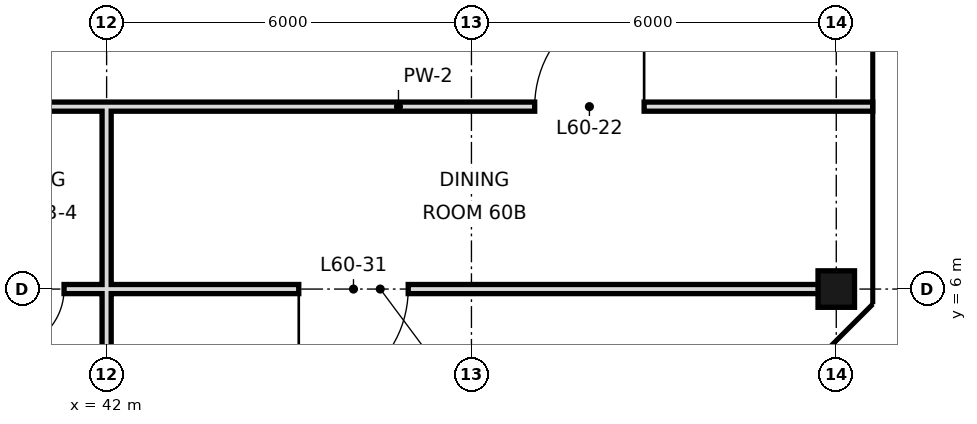
"""IFC4 building model, lengths in metres.
Left out: names, types, materials, properties, quantities, classifications, styles, units other than length and angle.
Written with IfcOpenShell. Run it as: python <this file> out.ifc"""

import sys

from ifc_helpers import new_model, si_unit, direction, frame, frame_2d, origin, origin_2d, place, context, subcontext, project, spatial, rectangle, hollow_rectangle, extrude, element, fill, save


model = new_model("IFC4")
c1 = context("Model", 3, precision=1e-05, world=origin(), true_north=direction((0.0, 1.0)))
c2 = subcontext(c1, "Body", "Model", "MODEL_VIEW")
j1 = project(units=[si_unit("LENGTHUNIT", "METRE"), si_unit("PLANEANGLEUNIT", "RADIAN")], contexts=[c1])
p1 = place(None, origin())
s1 = spatial("IfcSite", under=j1, at=p1, CompositionType="ELEMENT")
p2 = place(p1, origin())
s2 = spatial("IfcBuilding", under=s1, at=p2, CompositionType="ELEMENT")
p3 = place(p2, frame((0.0, 0.0, 254.0)))
s3 = spatial("IfcBuildingStorey", under=s2, at=p3, CompositionType="ELEMENT", Elevation=254.0)
p4 = place(p3, frame((54.0, 6.0, 0.0), z_axis=(0.0, 0.0, 1.0), x_axis=(1.0, 0.0, 0.0)))
e1 = element("IfcColumn", 1, at=p4, inside=s3, PredefinedType="COLUMN", context=c2, shape_type="SweptSolid", body=[
    extrude(hollow_rectangle(XDim=0.6, YDim=0.6, WallThickness=0.028, at=origin_2d()), origin(), (0.0, 0.0, 1.0), 3.6),
])
p5 = place(p3, frame((42.0, -0.6, 0.0), z_axis=(0.0, 0.0, 1.0), x_axis=(0.0, 1.0, 0.0)))
e2 = element("IfcWall", 2, at=p5, inside=s3, PredefinedType="PARTITIONING", context=c2, shape_type="SweptSolid", body=[
    extrude(rectangle(XDim=9.6, YDim=0.15, at=frame_2d((4.8, 0.0))), origin(), (0.0, 0.0, 1.0), 2.68),
])
p6 = place(p3, frame((39.0, 6.0, 0.0), z_axis=(0.0, 0.0, 1.0), x_axis=(1.0, 0.0, 0.0)))
e3 = element("IfcWall", 3, at=p6, inside=s3, PredefinedType="PARTITIONING", context=c2, shape_type="SweptSolid", body=[
    extrude(rectangle(XDim=15.0, YDim=0.15, at=frame_2d((7.5, 0.0))), origin(), (0.0, 0.0, 1.0), 2.93),
])
p7 = place(p6, frame((1.3, 0.0, 0.0)))
e4 = element("IfcOpeningElement", 4, at=p7, cuts=e3, PredefinedType="OPENING", context=c2, shape_type="SweptSolid", body=[
    extrude(rectangle(XDim=1.0, YDim=2.4, at=frame_2d((0.5, 1.2))), frame((0.0, 0.085, 0.0), z_axis=(0.0, -1.0, 0.0), x_axis=(1.0, 0.0, 0.0)), (0.0, 0.0, 1.0), 0.17),
])
p8 = place(p6, frame((6.16, 0.0, 0.0)))
e5 = element("IfcOpeningElement", 5, at=p8, cuts=e3, PredefinedType="OPENING", context=c2, shape_type="SweptSolid", body=[
    extrude(rectangle(XDim=1.8, YDim=2.4, at=frame_2d((0.9, 1.2))), frame((0.0, 0.085, 0.0), z_axis=(0.0, -1.0, 0.0), x_axis=(1.0, 0.0, 0.0)), (0.0, 0.0, 1.0), 0.17),
])
p9 = place(p3, frame((39.0, 9.0, 0.0), z_axis=(0.0, 0.0, 1.0), x_axis=(1.0, 0.0, 0.0)))
e6 = element("IfcWall", 6, at=p9, inside=s3, PredefinedType="PARTITIONING", context=c2, shape_type="SweptSolid", body=[
    extrude(rectangle(XDim=15.6, YDim=0.15, at=frame_2d((7.8, 0.0))), origin(), (0.0, 0.0, 1.0), 3.38),
])
p10 = place(p9, frame((1.0, 0.0, 0.0)))
e7 = element("IfcOpeningElement", 7, at=p10, cuts=e6, PredefinedType="OPENING", context=c2, shape_type="SweptSolid", body=[
    extrude(rectangle(XDim=1.0, YDim=2.4, at=frame_2d((0.5, 1.2))), frame((0.0, 0.085, 0.0), z_axis=(0.0, -1.0, 0.0), x_axis=(1.0, 0.0, 0.0)), (0.0, 0.0, 1.0), 0.17),
])
p11 = place(p9, frame((10.04, 0.0, 0.0)))
e8 = element("IfcOpeningElement", 8, at=p11, cuts=e6, PredefinedType="OPENING", context=c2, shape_type="SweptSolid", body=[
    extrude(rectangle(XDim=1.8, YDim=2.4, at=frame_2d((0.9, 1.2))), frame((0.0, 0.085, 0.0), z_axis=(0.0, -1.0, 0.0), x_axis=(1.0, 0.0, 0.0)), (0.0, 0.0, 1.0), 0.17),
])
p12 = place(p11, frame((1.8, 0.0, 0.0), z_axis=(0.0, 0.0, 1.0), x_axis=(-1.0, 0.0, 0.0)))
e9 = element("IfcDoor", 9, at=p12, inside=s3, OperationType="SINGLE_SWING_LEFT", PredefinedType="DOOR", context=c2, shape_type="SweptSolid", body=[
    extrude(rectangle(XDim=1.8, YDim=2.4, at=frame_2d((0.9, 1.2))), frame((0.0, 0.025, 0.0), z_axis=(0.0, -1.0, 0.0), x_axis=(1.0, 0.0, 0.0)), (0.0, 0.0, 1.0), 0.05),
])
fill(e8, e9)
p13 = place(p7, frame((1.0, 0.0, 0.0), z_axis=(0.0, 0.0, 1.0), x_axis=(-1.0, 0.0, 0.0)))
e10 = element("IfcDoor", 10, at=p13, inside=s3, OperationType="SINGLE_SWING_RIGHT", PredefinedType="DOOR", context=c2, shape_type="SweptSolid", body=[
    extrude(rectangle(XDim=1.0, YDim=2.4, at=frame_2d((0.5, 1.2))), frame((0.0, 0.025, 0.0), z_axis=(0.0, -1.0, 0.0), x_axis=(1.0, 0.0, 0.0)), (0.0, 0.0, 1.0), 0.05),
])
fill(e4, e10)
p14 = place(p8, frame((1.8, 0.0, 0.0), z_axis=(0.0, 0.0, 1.0), x_axis=(-1.0, 0.0, 0.0)))
e11 = element("IfcDoor", 11, at=p14, inside=s3, OperationType="SINGLE_SWING_RIGHT", PredefinedType="DOOR", context=c2, shape_type="SweptSolid", body=[
    extrude(rectangle(XDim=1.8, YDim=2.4, at=frame_2d((0.9, 1.2))), frame((0.0, 0.025, 0.0), z_axis=(0.0, -1.0, 0.0), x_axis=(1.0, 0.0, 0.0)), (0.0, 0.0, 1.0), 0.05),
])
fill(e5, e11)
save(model, sys.argv[1])
